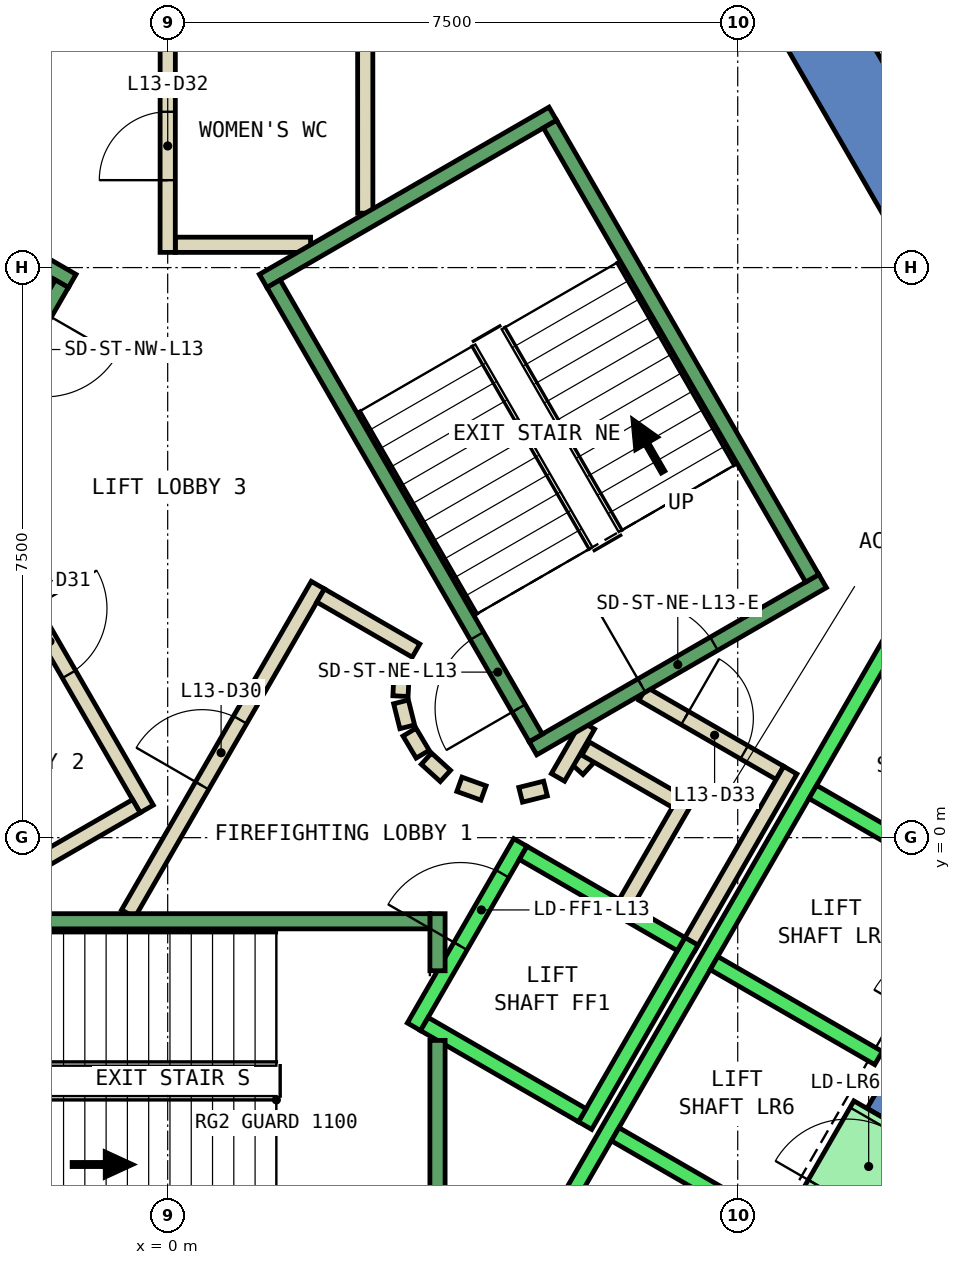
"""IFC4 building model, lengths in metres.
Left out: names, types, materials, properties, quantities, classifications, styles, units other than length and angle.
Written with IfcOpenShell. Run it as: python <this file> out.ifc"""

import sys

from ifc_helpers import new_model, si_unit, direction, frame, frame_2d, origin, place, context, subcontext, project, spatial, polyline, rectangle, outline, extrude, element, fill, save


model = new_model("IFC4")
c1 = context("Model", 3, precision=1e-05, world=origin(), true_north=direction((0.0, 1.0)))
c2 = subcontext(c1, "Body", "Model", "MODEL_VIEW")
j1 = project(units=[si_unit("LENGTHUNIT", "METRE"), si_unit("PLANEANGLEUNIT", "RADIAN")], contexts=[c1])
p1 = place(None, origin())
s1 = spatial("IfcSite", under=j1, at=p1, CompositionType="ELEMENT")
p2 = place(p1, origin())
s2 = spatial("IfcBuilding", under=s1, at=p2, CompositionType="ELEMENT")
p3 = place(p2, frame((0.0, 0.0, 64.4)))
s3 = spatial("IfcBuildingStorey", under=s2, at=p3, CompositionType="ELEMENT", Elevation=64.4)
p4 = place(p3, frame((0.0, 0.0, -0.4)))
e1 = element("IfcWall", 1, at=p4, inside=s3, PredefinedType="SHEAR", context=c2, shape_type="SweptSolid", body=[
    extrude(outline(polyline([(8.517, 11.748), (7.651, 11.248), (12.702, 2.5), (13.856, 2.5), (8.517, 11.748)])), origin(), (0.0, 0.0, 1.0), 4.2),
])
p5 = place(p3, frame((0.0, 0.0, -0.4)))
e2 = element("IfcWall", 2, at=p5, inside=s3, PredefinedType="SHEAR", context=c2, shape_type="SweptSolid", body=[
    extrude(outline(polyline([(10.717, -2.937), (9.851, -2.437), (9.201, -3.563), (10.067, -4.063), (10.717, -2.937)])), origin(), (0.0, 0.0, 1.0), 4.2),
])
p6 = place(p3, frame((0.0, 0.0, 3.6)))
e3 = element("IfcWall", 3, at=p6, inside=s3, PredefinedType="SHEAR", context=c2, shape_type="SweptSolid", body=[
    extrude(outline(polyline([(10.067, -4.063), (9.201, -3.563), (8.551, -4.689), (9.417, -5.189), (10.067, -4.063)])), origin(), (0.0, 0.0, 1.0), 0.2),
])
p7 = place(p3, frame((1.88, 7.8, 0.0), z_axis=(0.0, 0.0, 1.0), x_axis=(-1.0, 0.0, 0.0)))
e4 = element("IfcWall", 4, at=p7, inside=s3, PredefinedType="PARTITIONING", context=c2, shape_type="SweptSolid", body=[
    extrude(rectangle(XDim=1.78, YDim=0.2, at=frame_2d((0.89, 0.0))), origin(), (0.0, 0.0, 1.0), 3.8),
])
p8 = place(p3, frame((0.0, 7.7, 0.0), z_axis=(0.0, 0.0, 1.0), x_axis=(0.000325520816, 0.999999947018, 0.0)))
e5 = element("IfcWall", 5, at=p8, inside=s3, PredefinedType="PARTITIONING", context=c2, shape_type="SweptSolid", body=[
    extrude(rectangle(XDim=3.0, YDim=0.2, at=frame_2d((1.5, 0.0))), origin(), (0.0, 0.0, 1.0), 3.8),
])
p9 = place(p8, frame((0.95, 0.0, 0.0)))
e6 = element("IfcOpeningElement", 6, at=p9, cuts=e5, PredefinedType="OPENING", context=c2, shape_type="SweptSolid", body=[
    extrude(rectangle(XDim=0.9, YDim=2.1, at=frame_2d((0.45, 1.05))), frame((0.0, 0.11, 0.0), z_axis=(0.0, -1.0, 0.0), x_axis=(1.0, 0.0, 0.0)), (0.0, 0.0, 1.0), 0.22),
])
p10 = place(p3, frame((2.599, 10.7, 0.0), z_axis=(0.0, 0.0, 1.0), x_axis=(0.000393159002, -0.999999922713, 0.0)))
e7 = element("IfcWall", 7, at=p10, inside=s3, PredefinedType="PARTITIONING", context=c2, shape_type="SweptSolid", body=[
    extrude(rectangle(XDim=2.484, YDim=0.2, at=frame_2d((1.242, 0.0))), origin(), (0.0, 0.0, 1.0), 3.8),
])
p11 = place(p3, frame((5.39, 0.898, 0.0), z_axis=(0.0, 0.0, 1.0), x_axis=(0.673828488714, 0.738887791073, 0.0)))
e8 = element("IfcWall", 8, at=p11, inside=s3, PredefinedType="PARTITIONING", context=c2, shape_type="SweptSolid", body=[
    extrude(rectangle(XDim=0.263, YDim=0.2, at=frame_2d((0.131, 0.0))), origin(), (0.0, 0.0, 1.0), 3.8),
])
p12 = place(p3, frame((5.499, 1.172, 0.0), z_axis=(0.0, 0.0, 1.0), x_axis=(0.866333505267, -0.499465972466, 0.0)))
e9 = element("IfcWall", 9, at=p12, inside=s3, PredefinedType="PARTITIONING", context=c2, shape_type="SweptSolid", body=[
    extrude(rectangle(XDim=1.374, YDim=0.2, at=frame_2d((0.687, 0.0))), origin(), (0.0, 0.0, 1.0), 3.8),
])
p13 = place(p3, frame((6.826, 0.522, 0.0), z_axis=(0.0, 0.0, 1.0), x_axis=(-0.500016722714, -0.866015748706, 0.0)))
e10 = element("IfcWall", 10, at=p13, inside=s3, PredefinedType="PARTITIONING", context=c2, shape_type="SweptSolid", body=[
    extrude(rectangle(XDim=1.7, YDim=0.2, at=frame_2d((0.85, 0.0))), origin(), (0.0, 0.0, 1.0), 3.8),
])
p14 = place(p3, frame((6.25, 1.894, 0.0), z_axis=(0.0, 0.0, 1.0), x_axis=(0.866043184279, -0.499969202016, 0.0)))
e11 = element("IfcWall", 11, at=p14, inside=s3, PredefinedType="PARTITIONING", context=c2, shape_type="SweptSolid", body=[
    extrude(rectangle(XDim=2.084, YDim=0.2, at=frame_2d((1.042, 0.0))), origin(), (0.0, 0.0, 1.0), 3.8),
])
p15 = place(p14, frame((0.642, 0.0, 0.0)))
e12 = element("IfcOpeningElement", 12, at=p15, cuts=e11, PredefinedType="OPENING", context=c2, shape_type="SweptSolid", body=[
    extrude(rectangle(XDim=0.9, YDim=2.1, at=frame_2d((0.45, 1.05))), frame((0.0, 0.11, 0.0), z_axis=(0.0, -1.0, 0.0), x_axis=(1.0, 0.0, 0.0)), (0.0, 0.0, 1.0), 0.22),
])
p16 = place(p3, frame((8.192, 0.888, 0.0), z_axis=(0.0, 0.0, 1.0), x_axis=(-0.499940625693, -0.866059680843, 0.0)))
e13 = element("IfcWall", 13, at=p16, inside=s3, PredefinedType="PARTITIONING", context=c2, shape_type="SweptSolid", body=[
    extrude(rectangle(XDim=2.68, YDim=0.2, at=frame_2d((1.34, 0.0))), origin(), (0.0, 0.0, 1.0), 3.8),
])
p17 = place(p3, frame((5.135, 0.793, 0.0), z_axis=(0.0, 0.0, 1.0), x_axis=(0.499526442893, 0.866298639529, 0.0)))
e14 = element("IfcWall", 14, at=p17, inside=s3, PredefinedType="PARTITIONING", context=c2, shape_type="SweptSolid", body=[
    extrude(rectangle(XDim=0.791, YDim=0.2, at=frame_2d((0.396, 0.0))), origin(), (0.0, 0.0, 1.0), 3.8),
])
p18 = place(p3, frame((-0.52, -1.0, 0.0), z_axis=(0.0, 0.0, 1.0), x_axis=(0.50011622646, 0.865958290007, 0.0)))
e15 = element("IfcWall", 15, at=p18, inside=s3, PredefinedType="PARTITIONING", context=c2, shape_type="SweptSolid", body=[
    extrude(rectangle(XDim=4.991, YDim=0.2, at=frame_2d((2.496, 0.0))), origin(), (0.0, 0.0, 1.0), 3.8),
])
p19 = place(p18, frame((1.945, 0.0, 0.0)))
e16 = element("IfcOpeningElement", 16, at=p19, cuts=e15, PredefinedType="OPENING", context=c2, shape_type="SweptSolid", body=[
    extrude(rectangle(XDim=1.0, YDim=2.1, at=frame_2d((0.5, 1.05))), frame((0.0, 0.11, 0.0), z_axis=(0.0, -1.0, 0.0), x_axis=(1.0, 0.0, 0.0)), (0.0, 0.0, 1.0), 0.22),
])
p20 = place(p3, frame((2.012, 3.186, 0.0), z_axis=(0.0, 0.0, 1.0), x_axis=(0.865891012941, -0.500232699559, 0.0)))
e17 = element("IfcWall", 17, at=p20, inside=s3, PredefinedType="PARTITIONING", context=c2, shape_type="SweptSolid", body=[
    extrude(rectangle(XDim=1.449, YDim=0.2, at=frame_2d((0.725, 0.0))), origin(), (0.0, 0.0, 1.0), 3.8),
])
p21 = place(p3, frame((3.079, 2.199, 0.0), z_axis=(0.0, 0.0, 1.0), x_axis=(-0.047771483479, -0.998858290933, 0.0)))
e18 = element("IfcWall", 18, at=p21, inside=s3, PredefinedType="PARTITIONING", context=c2, shape_type="SweptSolid", body=[
    extrude(rectangle(XDim=0.337, YDim=0.2, at=frame_2d((0.169, 0.0))), origin(), (0.0, 0.0, 1.0), 3.8),
])
p22 = place(p3, frame((3.07, 1.786, 0.0), z_axis=(0.0, 0.0, 1.0), x_axis=(0.242705583207, -0.970099994784, 0.0)))
e19 = element("IfcWall", 19, at=p22, inside=s3, PredefinedType="PARTITIONING", context=c2, shape_type="SweptSolid", body=[
    extrude(rectangle(XDim=0.338, YDim=0.2, at=frame_2d((0.169, 0.0))), origin(), (0.0, 0.0, 1.0), 3.8),
])
for number, where, z_axis, x_axis in (
    (20, (3.182, 1.388, 0.0), (0.0, 0.0, 1.0), (0.512, -0.859, 0.0)),
    (21, (3.404, 1.039, 0.0), (0.0, 0.0, 1.0), (0.74, -0.672, 0.0)),
):
    element("IfcWall", number, at=place(p3, frame(where, z_axis=z_axis, x_axis=x_axis)), inside=s3, PredefinedType="PARTITIONING", context=c2, shape_type="SweptSolid", body=[
        extrude(rectangle(XDim=0.338, YDim=0.2, at=frame_2d((0.169, 0.0))), origin(), (0.0, 0.0, 1.0), 3.8),
    ])
p23 = place(p3, frame((3.838, 0.702, 0.0), z_axis=(0.0, 0.0, 1.0), x_axis=(0.941035081519, -0.338308993895, 0.0)))
e22 = element("IfcWall", 22, at=p23, inside=s3, PredefinedType="PARTITIONING", context=c2, shape_type="SweptSolid", body=[
    extrude(rectangle(XDim=0.337, YDim=0.2, at=frame_2d((0.168, 0.0))), origin(), (0.0, 0.0, 1.0), 3.8),
])
p24 = place(p3, frame((4.644, 0.564, 0.0), z_axis=(0.0, 0.0, 1.0), x_axis=(0.969929076366, 0.243387729394, 0.0)))
e23 = element("IfcWall", 23, at=p24, inside=s3, PredefinedType="PARTITIONING", context=c2, shape_type="SweptSolid", body=[
    extrude(rectangle(XDim=0.337, YDim=0.2, at=frame_2d((0.168, 0.0))), origin(), (0.0, 0.0, 1.0), 3.8),
])
p25 = place(p3, frame((-2.771, 4.7, 0.0), z_axis=(0.0, 0.0, 1.0), x_axis=(0.499969479948, -0.866043023828, 0.0)))
e24 = element("IfcWall", 24, at=p25, inside=s3, PredefinedType="PARTITIONING", context=c2, shape_type="SweptSolid", body=[
    extrude(rectangle(XDim=4.99, YDim=0.2, at=frame_2d((2.495, 0.0))), origin(), (0.0, 0.0, 1.0), 3.8),
])
p26 = place(p25, frame((1.945, 0.0, 0.0)))
e25 = element("IfcOpeningElement", 25, at=p26, cuts=e24, PredefinedType="OPENING", context=c2, shape_type="SweptSolid", body=[
    extrude(rectangle(XDim=1.0, YDim=2.1, at=frame_2d((0.5, 1.05))), frame((0.0, 0.11, 0.0), z_axis=(0.0, -1.0, 0.0), x_axis=(1.0, 0.0, 0.0)), (0.0, 0.0, 1.0), 0.22),
])
p27 = place(p3, frame((-0.412, 0.414, 0.0), z_axis=(0.0, 0.0, 1.0), x_axis=(-0.866017369001, -0.500013916395, 0.0)))
e26 = element("IfcWall", 26, at=p27, inside=s3, PredefinedType="PARTITIONING", context=c2, shape_type="SweptSolid", body=[
    extrude(rectangle(XDim=1.45, YDim=0.2, at=frame_2d((0.725, 0.0))), origin(), (0.0, 0.0, 1.0), 3.8),
])
p28 = place(p3, frame((3.24, -2.488, 0.0), z_axis=(0.0, 0.0, 1.0), x_axis=(0.49994636267, 0.866056369097, 0.0)))
e27 = element("IfcWall", 27, at=p28, inside=s3, PredefinedType="STANDARD", context=c2, shape_type="SweptSolid", body=[
    extrude(rectangle(XDim=2.8, YDim=0.2, at=frame_2d((1.4, 0.0))), origin(), (0.0, 0.0, 1.0), 3.8),
])
p29 = place(p28, frame((1.225, 0.0, 0.0)))
e28 = element("IfcOpeningElement", 28, at=p29, cuts=e27, PredefinedType="OPENING", context=c2, shape_type="SweptSolid", body=[
    extrude(rectangle(XDim=1.1, YDim=2.1, at=frame_2d((0.55, 1.05))), frame((0.0, 0.11, 0.0), z_axis=(0.0, -1.0, 0.0), x_axis=(1.0, 0.0, 0.0)), (0.0, 0.0, 1.0), 0.22),
])
p30 = place(p3, frame((5.492, -3.788, 0.0), z_axis=(0.0, 0.0, 1.0), x_axis=(0.500011755427, 0.866018616679, 0.0)))
e29 = element("IfcWall", 29, at=p30, inside=s3, PredefinedType="STANDARD", context=c2, shape_type="SweptSolid", body=[
    extrude(rectangle(XDim=2.8, YDim=0.2, at=frame_2d((1.4, 0.0))), origin(), (0.0, 0.0, 1.0), 3.8),
])
p31 = place(p3, frame((3.377, -2.452, 0.0), z_axis=(0.0, 0.0, 1.0), x_axis=(0.865955154139, -0.50012165622, 0.0)))
e30 = element("IfcWall", 30, at=p31, inside=s3, PredefinedType="STANDARD", context=c2, shape_type="SweptSolid", body=[
    extrude(rectangle(XDim=2.4, YDim=0.2, at=frame_2d((1.2, 0.0))), origin(), (0.0, 0.0, 1.0), 3.8),
])
p32 = place(p3, frame((4.677, -0.2, 0.0), z_axis=(0.0, 0.0, 1.0), x_axis=(0.865973769406, -0.500089422704, 0.0)))
e31 = element("IfcWall", 31, at=p32, inside=s3, PredefinedType="STANDARD", context=c2, shape_type="SweptSolid", body=[
    extrude(rectangle(XDim=2.399, YDim=0.2, at=frame_2d((1.2, 0.0))), origin(), (0.0, 0.0, 1.0), 3.8),
])
p33 = place(p3, frame((4.451, -6.19, 0.0), z_axis=(0.0, 0.0, 1.0), x_axis=(0.50000090737, 0.866024879913, 0.0)))
e32 = element("IfcWall", 32, at=p33, inside=s3, PredefinedType="STANDARD", context=c2, shape_type="SweptSolid", body=[
    extrude(rectangle(XDim=10.6, YDim=0.2, at=frame_2d((5.3, 0.0))), origin(), (0.0, 0.0, 1.0), 3.8),
])
for number, where, z_axis, x_axis in (
    (33, (5.888, -3.902, 0.0), (0.0, 0.0, 1.0), (0.866, -0.5, 0.0)),
    (34, (7.188, -1.65, 0.0), (0.0, 0.0, 1.0), (0.866, -0.5, 0.0)),
    (35, (8.488, 0.602, 0.0), (0.0, 0.0, 1.0), (0.866, -0.5, 0.0)),
):
    element("IfcWall", number, at=place(p3, frame(where, z_axis=z_axis, x_axis=x_axis)), inside=s3, PredefinedType="STANDARD", context=c2, shape_type="SweptSolid", body=[
        extrude(rectangle(XDim=2.5, YDim=0.2, at=frame_2d((1.25, 0.0))), origin(), (0.0, 0.0, 1.0), 3.8),
    ])
p34 = place(p3, frame((8.898, -4.889, 0.0), z_axis=(0.0, 0.0, 1.0), x_axis=(0.500036693733, 0.866004217611, 0.0)))
e36 = element("IfcWall", 36, at=p34, inside=s3, PredefinedType="STANDARD", context=c2, shape_type="SweptSolid", body=[
    extrude(rectangle(XDim=1.3, YDim=1.2, at=frame_2d((0.65, 0.0))), origin(), (0.0, 0.0, 1.0), 2.4),
])
p35 = place(p34, frame((0.1, 0.0, 0.0)))
e37 = element("IfcOpeningElement", 37, at=p35, cuts=e36, PredefinedType="OPENING", context=c2, shape_type="SweptSolid", body=[
    extrude(rectangle(XDim=1.1, YDim=2.3, at=frame_2d((0.55, 1.15))), frame((0.0, 0.61, 0.0), z_axis=(0.0, -1.0, 0.0), x_axis=(1.0, 0.0, 0.0)), (0.0, 0.0, 1.0), 1.22),
])
p36 = place(p3, frame((3.55, -2.667, 0.0), z_axis=(0.0, 0.0, 1.0), x_axis=(0.0, -1.0, 0.0)))
e38 = element("IfcWall", 38, at=p36, inside=s3, PredefinedType="STANDARD", context=c2, shape_type="SweptSolid", body=[
    extrude(rectangle(XDim=2.733, YDim=0.2, at=frame_2d((1.366, 0.0))), origin(), (0.0, 0.0, 1.0), 3.8),
])
p37 = place(p3, frame((3.55, -1.0, 0.0), z_axis=(0.0, 0.0, 1.0), x_axis=(0.0, -1.0, 0.0)))
e39 = element("IfcWall", 39, at=p37, inside=s3, PredefinedType="STANDARD", context=c2, shape_type="SweptSolid", body=[
    extrude(rectangle(XDim=0.751, YDim=0.2, at=frame_2d((0.375, 0.0))), origin(), (0.0, 0.0, 1.0), 3.8),
])
p38 = place(p3, frame((-3.45, -1.1, 0.0), z_axis=(0.0, 0.0, 1.0), x_axis=(1.0, 0.0, 0.0)))
e40 = element("IfcWall", 40, at=p38, inside=s3, PredefinedType="STANDARD", context=c2, shape_type="SweptSolid", body=[
    extrude(rectangle(XDim=6.9, YDim=0.2, at=frame_2d((3.45, 0.0))), origin(), (0.0, 0.0, 1.0), 3.8),
])
p39 = place(p38, frame((0.45, 0.0, 0.0)))
e41 = element("IfcOpeningElement", 41, at=p39, cuts=e40, PredefinedType="OPENING", context=c2, shape_type="SweptSolid", body=[
    extrude(rectangle(XDim=1.1, YDim=2.2, at=frame_2d((0.55, 1.1))), frame((0.0, 0.11, 0.0), z_axis=(0.0, -1.0, 0.0), x_axis=(1.0, 0.0, 0.0)), (0.0, 0.0, 1.0), 0.22),
])
p40 = place(p3, frame((4.806, 1.176, 0.0), z_axis=(0.0, 0.0, 1.0), x_axis=(0.866059941101, 0.499940174841, 0.0)))
e42 = element("IfcWall", 42, at=p40, inside=s3, PredefinedType="STANDARD", context=c2, shape_type="SweptSolid", body=[
    extrude(rectangle(XDim=4.4, YDim=0.2, at=frame_2d((2.2, 0.0))), origin(), (0.0, 0.0, 1.0), 3.8),
])
p41 = place(p40, frame((1.65, 0.0, 0.0)))
e43 = element("IfcOpeningElement", 43, at=p41, cuts=e42, PredefinedType="OPENING", context=c2, shape_type="SweptSolid", body=[
    extrude(rectangle(XDim=1.1, YDim=2.2, at=frame_2d((0.55, 1.1))), frame((0.0, 0.11, 0.0), z_axis=(0.0, -1.0, 0.0), x_axis=(1.0, 0.0, 0.0)), (0.0, 0.0, 1.0), 0.22),
])
p42 = place(p3, frame((1.256, 7.324, 0.0), z_axis=(0.0, 0.0, 1.0), x_axis=(0.866046073146, 0.499964197906, 0.0)))
e44 = element("IfcWall", 44, at=p42, inside=s3, PredefinedType="STANDARD", context=c2, shape_type="SweptSolid", body=[
    extrude(rectangle(XDim=4.4, YDim=0.2, at=frame_2d((2.2, 0.0))), origin(), (0.0, 0.0, 1.0), 3.8),
])
p43 = place(p3, frame((4.843, 1.312, 0.0), z_axis=(0.0, 0.0, 1.0), x_axis=(-0.499963383562, 0.866046543262, 0.0)))
e45 = element("IfcWall", 45, at=p43, inside=s3, PredefinedType="STANDARD", context=c2, shape_type="SweptSolid", body=[
    extrude(rectangle(XDim=6.9, YDim=0.2, at=frame_2d((3.45, 0.0))), origin(), (0.0, 0.0, 1.0), 3.8),
])
p44 = place(p43, frame((0.45, 0.0, 0.0)))
e46 = element("IfcOpeningElement", 46, at=p44, cuts=e45, PredefinedType="OPENING", context=c2, shape_type="SweptSolid", body=[
    extrude(rectangle(XDim=1.1, YDim=2.2, at=frame_2d((0.55, 1.1))), frame((0.0, 0.11, 0.0), z_axis=(0.0, -1.0, 0.0), x_axis=(1.0, 0.0, 0.0)), (0.0, 0.0, 1.0), 0.22),
])
p45 = place(p3, frame((8.48, 3.412, 0.0), z_axis=(0.0, 0.0, 1.0), x_axis=(-0.499978703459, 0.866037698999, 0.0)))
e47 = element("IfcWall", 47, at=p45, inside=s3, PredefinedType="STANDARD", context=c2, shape_type="SweptSolid", body=[
    extrude(rectangle(XDim=6.9, YDim=0.2, at=frame_2d((3.45, 0.0))), origin(), (0.0, 0.0, 1.0), 3.8),
])
p46 = place(p3, frame((-1.256, 7.324, 0.0), z_axis=(0.0, 0.0, 1.0), x_axis=(-0.866046073146, 0.499964197906, 0.0)))
e48 = element("IfcWall", 48, at=p46, inside=s3, PredefinedType="STANDARD", context=c2, shape_type="SweptSolid", body=[
    extrude(rectangle(XDim=4.4, YDim=0.2, at=frame_2d((2.2, 0.0))), origin(), (0.0, 0.0, 1.0), 3.8),
])
p47 = place(p46, frame((1.65, 0.0, 0.0)))
e49 = element("IfcOpeningElement", 49, at=p47, cuts=e48, PredefinedType="OPENING", context=c2, shape_type="SweptSolid", body=[
    extrude(rectangle(XDim=1.1, YDim=2.2, at=frame_2d((0.55, 1.1))), frame((0.0, 0.11, 0.0), z_axis=(0.0, -1.0, 0.0), x_axis=(1.0, 0.0, 0.0)), (0.0, 0.0, 1.0), 0.22),
])
p48 = place(p3, frame((-1.393, 7.288, 0.0), z_axis=(0.0, 0.0, 1.0), x_axis=(-0.499963383562, -0.866046543262, 0.0)))
e50 = element("IfcWall", 50, at=p48, inside=s3, PredefinedType="STANDARD", context=c2, shape_type="SweptSolid", body=[
    extrude(rectangle(XDim=6.9, YDim=0.2, at=frame_2d((3.45, 0.0))), origin(), (0.0, 0.0, 1.0), 3.8),
])
p49 = place(p48, frame((0.45, 0.0, 0.0)))
e51 = element("IfcOpeningElement", 51, at=p49, cuts=e50, PredefinedType="OPENING", context=c2, shape_type="SweptSolid", body=[
    extrude(rectangle(XDim=1.1, YDim=2.2, at=frame_2d((0.55, 1.1))), frame((0.0, 0.11, 0.0), z_axis=(0.0, -1.0, 0.0), x_axis=(1.0, 0.0, 0.0)), (0.0, 0.0, 1.0), 0.22),
])
p50 = place(p19, origin())
e52 = element("IfcDoor", 52, at=p50, inside=s3, OperationType="SINGLE_SWING_LEFT", PredefinedType="DOOR", context=c2, shape_type="SweptSolid", body=[
    extrude(rectangle(XDim=1.0, YDim=2.1, at=frame_2d((0.5, 1.05))), frame((0.0, 0.025, 0.0), z_axis=(0.0, -1.0, 0.0), x_axis=(1.0, 0.0, 0.0)), (0.0, 0.0, 1.0), 0.05),
])
fill(e16, e52)
p51 = place(p26, origin())
e53 = element("IfcDoor", 53, at=p51, inside=s3, OperationType="SINGLE_SWING_RIGHT", PredefinedType="DOOR", context=c2, shape_type="SweptSolid", body=[
    extrude(rectangle(XDim=1.0, YDim=2.1, at=frame_2d((0.5, 1.05))), frame((0.0, 0.025, 0.0), z_axis=(0.0, -1.0, 0.0), x_axis=(1.0, 0.0, 0.0)), (0.0, 0.0, 1.0), 0.05),
])
fill(e25, e53)
p52 = place(p9, origin())
e54 = element("IfcDoor", 54, at=p52, inside=s3, OperationType="SINGLE_SWING_RIGHT", PredefinedType="DOOR", context=c2, shape_type="SweptSolid", body=[
    extrude(rectangle(XDim=0.9, YDim=2.1, at=frame_2d((0.45, 1.05))), frame((0.0, 0.025, 0.0), z_axis=(0.0, -1.0, 0.0), x_axis=(1.0, 0.0, 0.0)), (0.0, 0.0, 1.0), 0.05),
])
fill(e6, e54)
p53 = place(p15, origin())
e55 = element("IfcDoor", 55, at=p53, inside=s3, OperationType="SINGLE_SWING_LEFT", PredefinedType="DOOR", context=c2, shape_type="SweptSolid", body=[
    extrude(rectangle(XDim=0.9, YDim=2.1, at=frame_2d((0.45, 1.05))), frame((0.0, 0.025, 0.0), z_axis=(0.0, -1.0, 0.0), x_axis=(1.0, 0.0, 0.0)), (0.0, 0.0, 1.0), 0.05),
])
fill(e12, e55)
p54 = place(p35, origin())
e56 = element("IfcDoor", 56, at=p54, inside=s3, OperationType="SLIDING_TO_LEFT", PredefinedType="DOOR", context=c2, shape_type="SweptSolid", body=[
    extrude(rectangle(XDim=1.1, YDim=2.3, at=frame_2d((0.55, 1.15))), frame((0.0, 0.025, 0.0), z_axis=(0.0, -1.0, 0.0), x_axis=(1.0, 0.0, 0.0)), (0.0, 0.0, 1.0), 0.05),
])
fill(e37, e56)
p55 = place(p29, origin())
e57 = element("IfcDoor", 57, at=p55, inside=s3, OperationType="SLIDING_TO_LEFT", PredefinedType="DOOR", context=c2, shape_type="SweptSolid", body=[
    extrude(rectangle(XDim=1.1, YDim=2.1, at=frame_2d((0.55, 1.05))), frame((0.0, 0.025, 0.0), z_axis=(0.0, -1.0, 0.0), x_axis=(1.0, 0.0, 0.0)), (0.0, 0.0, 1.0), 0.05),
])
fill(e28, e57)
p56 = place(p44, origin())
e58 = element("IfcDoor", 58, at=p56, inside=s3, OperationType="SINGLE_SWING_LEFT", PredefinedType="DOOR", context=c2, shape_type="SweptSolid", body=[
    extrude(rectangle(XDim=1.1, YDim=2.2, at=frame_2d((0.55, 1.1))), frame((0.0, 0.025, 0.0), z_axis=(0.0, -1.0, 0.0), x_axis=(1.0, 0.0, 0.0)), (0.0, 0.0, 1.0), 0.05),
])
fill(e46, e58)
p57 = place(p41, origin())
e59 = element("IfcDoor", 59, at=p57, inside=s3, OperationType="SINGLE_SWING_LEFT", PredefinedType="DOOR", context=c2, shape_type="SweptSolid", body=[
    extrude(rectangle(XDim=1.1, YDim=2.2, at=frame_2d((0.55, 1.1))), frame((0.0, 0.025, 0.0), z_axis=(0.0, -1.0, 0.0), x_axis=(1.0, 0.0, 0.0)), (0.0, 0.0, 1.0), 0.05),
])
fill(e43, e59)
save(model, sys.argv[1])
